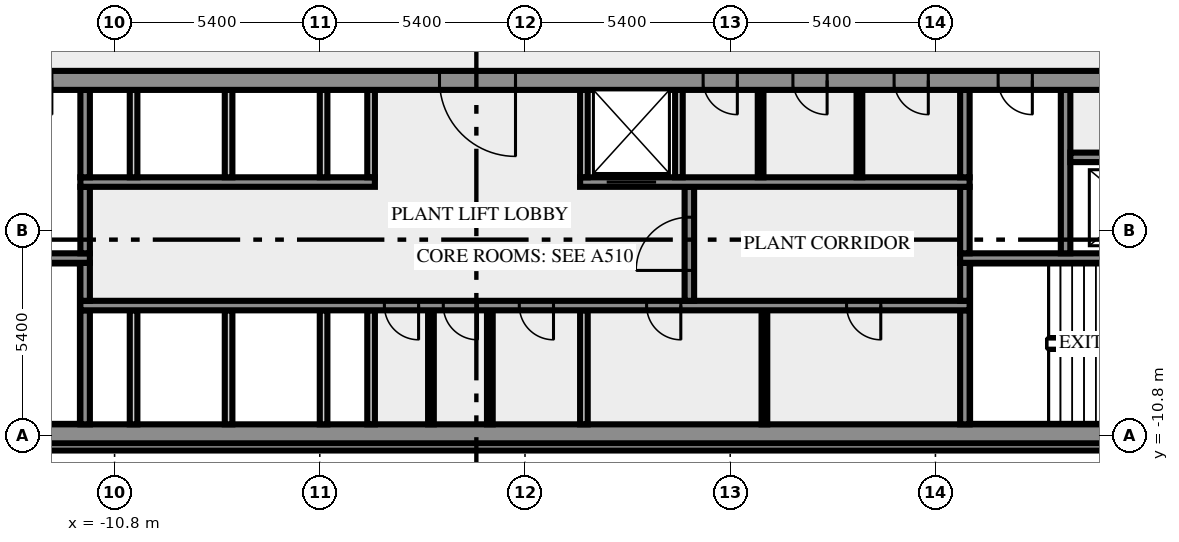
"""IFC4 building model, lengths in metres.
Left out: names, types, materials, properties, quantities, classifications, styles, units other than length and angle.
Written with IfcOpenShell. Run it as: python <this file> out.ifc"""

import sys

from ifc_helpers import new_model, si_unit, direction, frame, frame_2d, origin, place, context, subcontext, project, spatial, rectangle, extrude, element, fill, save


model = new_model("IFC4")
c1 = context("Model", 3, precision=1e-05, world=origin(), true_north=direction((0.0, 1.0)))
c2 = subcontext(c1, "Body", "Model", "MODEL_VIEW")
j1 = project(units=[si_unit("LENGTHUNIT", "METRE"), si_unit("PLANEANGLEUNIT", "RADIAN")], contexts=[c1])
p1 = place(None, origin())
s1 = spatial("IfcSite", under=j1, at=p1, CompositionType="ELEMENT")
p2 = place(p1, origin())
s2 = spatial("IfcBuilding", under=s1, at=p2, CompositionType="ELEMENT")
p3 = place(p2, frame((0.0, 0.0, 273.0)))
s3 = spatial("IfcBuildingStorey", under=s2, at=p3, CompositionType="ELEMENT", Elevation=273.0)
p4 = place(p3, frame((-17.444, -11.088, 0.0), z_axis=(0.0, 0.0, 1.0), x_axis=(1.0, 0.0, 0.0)))
e1 = element("IfcWall", 1, at=p4, inside=s3, PredefinedType="SOLIDWALL", context=c2, shape_type="SweptSolid", body=[
    extrude(rectangle(XDim=34.888, YDim=0.2, at=frame_2d((17.444, 0.0))), origin(), (0.0, 0.0, 1.0), 7.65),
])
p5 = place(p3, frame((-20.0, -10.75, 0.0), z_axis=(0.0, 0.0, 1.0), x_axis=(1.0, 0.0, 0.0)))
e2 = element("IfcWall", 2, at=p5, inside=s3, PredefinedType="SHEAR", context=c2, shape_type="SweptSolid", body=[
    extrude(rectangle(XDim=40.0, YDim=0.5, at=frame_2d((20.0, 0.0))), origin(), (0.0, 0.0, 1.0), 7.65),
])
p6 = place(p5, frame((0.8, 0.0, 1.0)))
e3 = element("IfcOpeningElement", 3, at=p6, cuts=e2, PredefinedType="OPENING", context=c2, shape_type="SweptSolid", body=[
    extrude(rectangle(XDim=1.2, YDim=1.2, at=frame_2d((0.6, 0.6))), frame((0.0, 0.26, 0.0), z_axis=(0.0, -1.0, 0.0), x_axis=(1.0, 0.0, 0.0)), (0.0, 0.0, 1.0), 0.52),
])
p7 = place(p5, frame((38.0, 0.0, 1.0)))
e4 = element("IfcOpeningElement", 4, at=p7, cuts=e2, PredefinedType="OPENING", context=c2, shape_type="SweptSolid", body=[
    extrude(rectangle(XDim=1.2, YDim=1.2, at=frame_2d((0.6, 0.6))), frame((0.0, 0.26, 0.0), z_axis=(0.0, -1.0, 0.0), x_axis=(1.0, 0.0, 0.0)), (0.0, 0.0, 1.0), 0.52),
])
p8 = place(p3, frame((-11.575, -10.5, 0.0), z_axis=(0.0, 0.0, 1.0), x_axis=(0.0, 1.0, 0.0)))
e5 = element("IfcWall", 5, at=p8, inside=s3, PredefinedType="SHEAR", context=c2, shape_type="SweptSolid", body=[
    extrude(rectangle(XDim=3.0, YDim=0.25, at=frame_2d((1.5, 0.0))), origin(), (0.0, 0.0, 1.0), 7.65),
])
for number, where, z_axis, x_axis in (
    (6, (-10.3, -10.5, 0.0), (0.0, 0.0, 1.0), (0.0, 1.0, 0.0)),
    (7, (-7.8, -10.5, 0.0), (0.0, 0.0, 1.0), (0.0, 1.0, 0.0)),
    (8, (-5.3, -10.5, 0.0), (0.0, 0.0, 1.0), (0.0, 1.0, 0.0)),
    (9, (-4.05, -10.5, 0.0), (0.0, 0.0, 1.0), (0.0, 1.0, 0.0)),
):
    element("IfcWall", number, at=place(p3, frame(where, z_axis=z_axis, x_axis=x_axis)), inside=s3, PredefinedType="SOLIDWALL", context=c2, shape_type="SweptSolid", body=[
        extrude(rectangle(XDim=3.0, YDim=0.2, at=frame_2d((1.5, 0.0))), origin(), (0.0, 0.0, 1.0), 7.65),
    ])
for number, where, z_axis, x_axis in (
    (10, (-2.475, -10.5, 0.0), (0.0, 0.0, 1.0), (0.0, 1.0, 0.0)),
    (11, (-0.925, -10.5, 0.0), (0.0, 0.0, 1.0), (0.0, 1.0, 0.0)),
):
    element("IfcWall", number, at=place(p3, frame(where, z_axis=z_axis, x_axis=x_axis)), inside=s3, PredefinedType="PARTITIONING", context=c2, shape_type="SweptSolid", body=[
        extrude(rectangle(XDim=3.0, YDim=0.15, at=frame_2d((1.5, 0.0))), origin(), (0.0, 0.0, 1.0), 7.65),
    ])
p9 = place(p3, frame((1.55, -10.5, 0.0), z_axis=(0.0, 0.0, 1.0), x_axis=(0.0, 1.0, 0.0)))
e12 = element("IfcWall", 12, at=p9, inside=s3, PredefinedType="SOLIDWALL", context=c2, shape_type="SweptSolid", body=[
    extrude(rectangle(XDim=3.0, YDim=0.2, at=frame_2d((1.5, 0.0))), origin(), (0.0, 0.0, 1.0), 7.65),
])
p10 = place(p3, frame((6.3, -10.5, 0.0), z_axis=(0.0, 0.0, 1.0), x_axis=(0.0, 1.0, 0.0)))
e13 = element("IfcWall", 13, at=p10, inside=s3, PredefinedType="PARTITIONING", context=c2, shape_type="SweptSolid", body=[
    extrude(rectangle(XDim=3.0, YDim=0.15, at=frame_2d((1.5, 0.0))), origin(), (0.0, 0.0, 1.0), 7.65),
])
p11 = place(p3, frame((11.575, -10.5, 0.0), z_axis=(0.0, 0.0, 1.0), x_axis=(0.0, 1.0, 0.0)))
e14 = element("IfcWall", 14, at=p11, inside=s3, PredefinedType="SHEAR", context=c2, shape_type="SweptSolid", body=[
    extrude(rectangle(XDim=3.0, YDim=0.25, at=frame_2d((1.5, 0.0))), origin(), (0.0, 0.0, 1.0), 7.65),
])
p12 = place(p3, frame((11.7, -7.375, 0.0), z_axis=(0.0, 0.0, 1.0), x_axis=(-1.0, 0.0, 0.0)))
e15 = element("IfcWall", 15, at=p12, inside=s3, PredefinedType="SHEAR", context=c2, shape_type="SweptSolid", body=[
    extrude(rectangle(XDim=23.4, YDim=0.25, at=frame_2d((11.7, 0.0))), origin(), (0.0, 0.0, 1.0), 7.65),
])
p13 = place(p12, frame((14.5, 0.0, 0.0)))
e16 = element("IfcOpeningElement", 16, at=p13, cuts=e15, PredefinedType="OPENING", context=c2, shape_type="SweptSolid", body=[
    extrude(rectangle(XDim=0.9, YDim=2.1, at=frame_2d((0.45, 1.05))), frame((0.0, 0.135, 0.0), z_axis=(0.0, -1.0, 0.0), x_axis=(1.0, 0.0, 0.0)), (0.0, 0.0, 1.0), 0.27),
])
p14 = place(p12, frame((12.95, 0.0, 0.0)))
e17 = element("IfcOpeningElement", 17, at=p14, cuts=e15, PredefinedType="OPENING", context=c2, shape_type="SweptSolid", body=[
    extrude(rectangle(XDim=0.9, YDim=2.1, at=frame_2d((0.45, 1.05))), frame((0.0, 0.135, 0.0), z_axis=(0.0, -1.0, 0.0), x_axis=(1.0, 0.0, 0.0)), (0.0, 0.0, 1.0), 0.27),
])
p15 = place(p12, frame((10.95, 0.0, 0.0)))
e18 = element("IfcOpeningElement", 18, at=p15, cuts=e15, PredefinedType="OPENING", context=c2, shape_type="SweptSolid", body=[
    extrude(rectangle(XDim=0.9, YDim=2.1, at=frame_2d((0.45, 1.05))), frame((0.0, 0.135, 0.0), z_axis=(0.0, -1.0, 0.0), x_axis=(1.0, 0.0, 0.0)), (0.0, 0.0, 1.0), 0.27),
])
p16 = place(p12, frame((7.6, 0.0, 0.0)))
e19 = element("IfcOpeningElement", 19, at=p16, cuts=e15, PredefinedType="OPENING", context=c2, shape_type="SweptSolid", body=[
    extrude(rectangle(XDim=0.9, YDim=2.1, at=frame_2d((0.45, 1.05))), frame((0.0, 0.135, 0.0), z_axis=(0.0, -1.0, 0.0), x_axis=(1.0, 0.0, 0.0)), (0.0, 0.0, 1.0), 0.27),
])
p17 = place(p12, frame((2.338, 0.0, 0.0)))
e20 = element("IfcOpeningElement", 20, at=p17, cuts=e15, PredefinedType="OPENING", context=c2, shape_type="SweptSolid", body=[
    extrude(rectangle(XDim=0.9, YDim=2.1, at=frame_2d((0.45, 1.05))), frame((0.0, 0.135, 0.0), z_axis=(0.0, -1.0, 0.0), x_axis=(1.0, 0.0, 0.0)), (0.0, 0.0, 1.0), 0.27),
])
p18 = place(p3, frame((-11.575, -7.25, 0.0), z_axis=(0.0, 0.0, 1.0), x_axis=(0.0, 1.0, 0.0)))
e21 = element("IfcWall", 21, at=p18, inside=s3, PredefinedType="SHEAR", context=c2, shape_type="SweptSolid", body=[
    extrude(rectangle(XDim=1.0, YDim=0.25, at=frame_2d((0.5, 0.0))), origin(), (0.0, 0.0, 1.0), 7.65),
])
p19 = place(p3, frame((4.325, -7.25, 0.0), z_axis=(0.0, 0.0, 1.0), x_axis=(0.0, 1.0, 0.0)))
e22 = element("IfcWall", 22, at=p19, inside=s3, PredefinedType="SHEAR", context=c2, shape_type="SweptSolid", body=[
    extrude(rectangle(XDim=3.0, YDim=0.25, at=frame_2d((1.5, 0.0))), origin(), (0.0, 0.0, 1.0), 7.65),
])
p20 = place(p19, frame((0.8, 0.0, 0.0)))
e23 = element("IfcOpeningElement", 23, at=p20, cuts=e22, PredefinedType="OPENING", context=c2, shape_type="SweptSolid", body=[
    extrude(rectangle(XDim=1.4, YDim=2.1, at=frame_2d((0.7, 1.05))), frame((0.0, 0.135, 0.0), z_axis=(0.0, -1.0, 0.0), x_axis=(1.0, 0.0, 0.0)), (0.0, 0.0, 1.0), 0.27),
])
p21 = place(p3, frame((11.575, -7.25, 0.0), z_axis=(0.0, 0.0, 1.0), x_axis=(0.0, 1.0, 0.0)))
e24 = element("IfcWall", 24, at=p21, inside=s3, PredefinedType="SHEAR", context=c2, shape_type="SweptSolid", body=[
    extrude(rectangle(XDim=1.0, YDim=0.25, at=frame_2d((0.5, 0.0))), origin(), (0.0, 0.0, 1.0), 7.65),
])
p22 = place(p3, frame((-11.45, -6.125, 0.0), z_axis=(0.0, 0.0, 1.0), x_axis=(-1.0, 0.0, 0.0)))
e25 = element("IfcWall", 25, at=p22, inside=s3, PredefinedType="SHEAR", context=c2, shape_type="SweptSolid", body=[
    extrude(rectangle(XDim=8.05, YDim=0.25, at=frame_2d((4.025, 0.0))), origin(), (0.0, 0.0, 1.0), 7.65),
])
p23 = place(p22, frame((6.2, 0.0, 0.0)))
e26 = element("IfcOpeningElement", 26, at=p23, cuts=e25, PredefinedType="OPENING", context=c2, shape_type="SweptSolid", body=[
    extrude(rectangle(XDim=1.8, YDim=2.1, at=frame_2d((0.9, 1.05))), frame((0.0, 0.135, 0.0), z_axis=(0.0, -1.0, 0.0), x_axis=(1.0, 0.0, 0.0)), (0.0, 0.0, 1.0), 0.27),
])
p24 = place(p3, frame((19.5, -6.125, 0.0), z_axis=(0.0, 0.0, 1.0), x_axis=(-1.0, 0.0, 0.0)))
e27 = element("IfcWall", 27, at=p24, inside=s3, PredefinedType="SHEAR", context=c2, shape_type="SweptSolid", body=[
    extrude(rectangle(XDim=8.05, YDim=0.25, at=frame_2d((4.025, 0.0))), origin(), (0.0, 0.0, 1.0), 7.65),
])
p25 = place(p24, frame((0.05, 0.0, 0.0)))
e28 = element("IfcOpeningElement", 28, at=p25, cuts=e27, PredefinedType="OPENING", context=c2, shape_type="SweptSolid", body=[
    extrude(rectangle(XDim=1.8, YDim=2.1, at=frame_2d((0.9, 1.05))), frame((0.0, 0.135, 0.0), z_axis=(0.0, -1.0, 0.0), x_axis=(1.0, 0.0, 0.0)), (0.0, 0.0, 1.0), 0.27),
])
for number, where, z_axis, x_axis in (
    (29, (-11.575, -6.0, 0.0), (0.0, 0.0, 1.0), (0.0, 1.0, 0.0)),
    (30, (11.575, -6.0, 0.0), (0.0, 0.0, 1.0), (0.0, 1.0, 0.0)),
):
    element("IfcWall", number, at=place(p3, frame(where, z_axis=z_axis, x_axis=x_axis)), inside=s3, PredefinedType="SHEAR", context=c2, shape_type="SweptSolid", body=[
        extrude(rectangle(XDim=1.75, YDim=0.25, at=frame_2d((0.875, 0.0))), origin(), (0.0, 0.0, 1.0), 7.65),
    ])
p26 = place(p3, frame((14.225, -6.0, 0.0), z_axis=(0.0, 0.0, 1.0), x_axis=(0.0, 1.0, 0.0)))
e31 = element("IfcWall", 31, at=p26, inside=s3, PredefinedType="SHEAR", context=c2, shape_type="SweptSolid", body=[
    extrude(rectangle(XDim=4.3, YDim=0.25, at=frame_2d((2.15, 0.0))), origin(), (0.0, 0.0, 1.0), 7.65),
])
p27 = place(p3, frame((-11.7, -4.125, 0.0), z_axis=(0.0, 0.0, 1.0), x_axis=(1.0, 0.0, 0.0)))
e32 = element("IfcWall", 32, at=p27, inside=s3, PredefinedType="SHEAR", context=c2, shape_type="SweptSolid", body=[
    extrude(rectangle(XDim=7.75, YDim=0.25, at=frame_2d((3.875, 0.0))), origin(), (0.0, 0.0, 1.0), 7.65),
])
p28 = place(p3, frame((1.45, -4.125, 0.0), z_axis=(0.0, 0.0, 1.0), x_axis=(1.0, 0.0, 0.0)))
e33 = element("IfcWall", 33, at=p28, inside=s3, PredefinedType="SHEAR", context=c2, shape_type="SweptSolid", body=[
    extrude(rectangle(XDim=10.25, YDim=0.25, at=frame_2d((5.125, 0.0))), origin(), (0.0, 0.0, 1.0), 7.65),
])
p29 = place(p28, frame((0.7, 0.0, 0.0)))
e34 = element("IfcOpeningElement", 34, at=p29, cuts=e33, PredefinedType="OPENING", context=c2, shape_type="SweptSolid", body=[
    extrude(rectangle(XDim=1.3, YDim=2.1, at=frame_2d((0.65, 1.05))), frame((0.0, 0.135, 0.0), z_axis=(0.0, -1.0, 0.0), x_axis=(1.0, 0.0, 0.0)), (0.0, 0.0, 1.0), 0.27),
])
p30 = place(p3, frame((-11.575, -4.0, 0.0), z_axis=(0.0, 0.0, 1.0), x_axis=(0.0, 1.0, 0.0)))
e35 = element("IfcWall", 35, at=p30, inside=s3, PredefinedType="SHEAR", context=c2, shape_type="SweptSolid", body=[
    extrude(rectangle(XDim=2.3, YDim=0.25, at=frame_2d((1.15, 0.0))), origin(), (0.0, 0.0, 1.0), 7.65),
])
for number, where, z_axis, x_axis in (
    (36, (-10.3, -4.0, 0.0), (0.0, 0.0, 1.0), (0.0, 1.0, 0.0)),
    (37, (-7.8, -4.0, 0.0), (0.0, 0.0, 1.0), (0.0, 1.0, 0.0)),
    (38, (-5.3, -4.0, 0.0), (0.0, 0.0, 1.0), (0.0, 1.0, 0.0)),
    (39, (-4.05, -4.0, 0.0), (0.0, 0.0, 1.0), (0.0, 1.0, 0.0)),
    (40, (1.55, -4.0, 0.0), (0.0, 0.0, 1.0), (0.0, 1.0, 0.0)),
    (41, (4.05, -4.0, 0.0), (0.0, 0.0, 1.0), (0.0, 1.0, 0.0)),
):
    element("IfcWall", number, at=place(p3, frame(where, z_axis=z_axis, x_axis=x_axis)), inside=s3, PredefinedType="SOLIDWALL", context=c2, shape_type="SweptSolid", body=[
        extrude(rectangle(XDim=2.3, YDim=0.2, at=frame_2d((1.15, 0.0))), origin(), (0.0, 0.0, 1.0), 7.65),
    ])
for number, where, z_axis, x_axis in (
    (42, (6.2, -4.0, 0.0), (0.0, 0.0, 1.0), (0.0, 1.0, 0.0)),
    (43, (8.8, -4.0, 0.0), (0.0, 0.0, 1.0), (0.0, 1.0, 0.0)),
):
    element("IfcWall", number, at=place(p3, frame(where, z_axis=z_axis, x_axis=x_axis)), inside=s3, PredefinedType="PARTITIONING", context=c2, shape_type="SweptSolid", body=[
        extrude(rectangle(XDim=2.3, YDim=0.15, at=frame_2d((1.15, 0.0))), origin(), (0.0, 0.0, 1.0), 7.65),
    ])
p31 = place(p3, frame((11.575, -4.0, 0.0), z_axis=(0.0, 0.0, 1.0), x_axis=(0.0, 1.0, 0.0)))
e44 = element("IfcWall", 44, at=p31, inside=s3, PredefinedType="SHEAR", context=c2, shape_type="SweptSolid", body=[
    extrude(rectangle(XDim=2.3, YDim=0.25, at=frame_2d((1.15, 0.0))), origin(), (0.0, 0.0, 1.0), 7.65),
])
p32 = place(p3, frame((14.35, -3.475, 0.0), z_axis=(0.0, 0.0, 1.0), x_axis=(1.0, 0.0, 0.0)))
e45 = element("IfcWall", 45, at=p32, inside=s3, PredefinedType="SHEAR", context=c2, shape_type="SweptSolid", body=[
    extrude(rectangle(XDim=3.0, YDim=0.25, at=frame_2d((1.5, 0.0))), origin(), (0.0, 0.0, 1.0), 7.65),
])
p33 = place(p3, frame((20.49, -1.45, 0.0), z_axis=(0.0, 0.0, 1.0), x_axis=(-1.0, 0.0, 0.0)))
e46 = element("IfcWall", 46, at=p33, inside=s3, PredefinedType="SHEAR", context=c2, shape_type="SweptSolid", body=[
    extrude(rectangle(XDim=40.98, YDim=0.5, at=frame_2d((20.49, 0.0))), origin(), (0.0, 0.0, 1.0), 7.65),
])
p34 = place(p33, frame((38.14, 0.0, 0.0)))
e47 = element("IfcOpeningElement", 47, at=p34, cuts=e46, PredefinedType="OPENING", context=c2, shape_type="SweptSolid", body=[
    extrude(rectangle(XDim=1.8, YDim=2.1, at=frame_2d((0.9, 1.05))), frame((0.0, 0.26, 0.0), z_axis=(0.0, -1.0, 0.0), x_axis=(1.0, 0.0, 0.0)), (0.0, 0.0, 1.0), 0.52),
])
p35 = place(p33, frame((36.728, 0.0, 0.0)))
e48 = element("IfcOpeningElement", 48, at=p35, cuts=e46, PredefinedType="OPENING", context=c2, shape_type="SweptSolid", body=[
    extrude(rectangle(XDim=0.8, YDim=2.1, at=frame_2d((0.4, 1.05))), frame((0.0, 0.26, 0.0), z_axis=(0.0, -1.0, 0.0), x_axis=(1.0, 0.0, 0.0)), (0.0, 0.0, 1.0), 0.52),
])
p36 = place(p33, frame((35.153, 0.0, 0.0)))
e49 = element("IfcOpeningElement", 49, at=p36, cuts=e46, PredefinedType="OPENING", context=c2, shape_type="SweptSolid", body=[
    extrude(rectangle(XDim=0.8, YDim=2.1, at=frame_2d((0.4, 1.05))), frame((0.0, 0.26, 0.0), z_axis=(0.0, -1.0, 0.0), x_axis=(1.0, 0.0, 0.0)), (0.0, 0.0, 1.0), 0.52),
])
p37 = place(p33, frame((32.94, 0.0, 0.0)))
e50 = element("IfcOpeningElement", 50, at=p37, cuts=e46, PredefinedType="OPENING", context=c2, shape_type="SweptSolid", body=[
    extrude(rectangle(XDim=0.9, YDim=2.1, at=frame_2d((0.45, 1.05))), frame((0.0, 0.26, 0.0), z_axis=(0.0, -1.0, 0.0), x_axis=(1.0, 0.0, 0.0)), (0.0, 0.0, 1.0), 0.52),
])
p38 = place(p33, frame((20.74, 0.0, 0.0)))
e51 = element("IfcOpeningElement", 51, at=p38, cuts=e46, PredefinedType="OPENING", context=c2, shape_type="SweptSolid", body=[
    extrude(rectangle(XDim=2.0, YDim=2.1, at=frame_2d((1.0, 1.05))), frame((0.0, 0.26, 0.0), z_axis=(0.0, -1.0, 0.0), x_axis=(1.0, 0.0, 0.0)), (0.0, 0.0, 1.0), 0.52),
])
p39 = place(p33, frame((14.903, 0.0, 0.0)))
e52 = element("IfcOpeningElement", 52, at=p39, cuts=e46, PredefinedType="OPENING", context=c2, shape_type="SweptSolid", body=[
    extrude(rectangle(XDim=0.9, YDim=2.1, at=frame_2d((0.45, 1.05))), frame((0.0, 0.26, 0.0), z_axis=(0.0, -1.0, 0.0), x_axis=(1.0, 0.0, 0.0)), (0.0, 0.0, 1.0), 0.52),
])
p40 = place(p33, frame((12.54, 0.0, 0.0)))
e53 = element("IfcOpeningElement", 53, at=p40, cuts=e46, PredefinedType="OPENING", context=c2, shape_type="SweptSolid", body=[
    extrude(rectangle(XDim=0.9, YDim=2.1, at=frame_2d((0.45, 1.05))), frame((0.0, 0.26, 0.0), z_axis=(0.0, -1.0, 0.0), x_axis=(1.0, 0.0, 0.0)), (0.0, 0.0, 1.0), 0.52),
])
p41 = place(p33, frame((9.877, 0.0, 0.0)))
e54 = element("IfcOpeningElement", 54, at=p41, cuts=e46, PredefinedType="OPENING", context=c2, shape_type="SweptSolid", body=[
    extrude(rectangle(XDim=0.9, YDim=2.1, at=frame_2d((0.45, 1.05))), frame((0.0, 0.26, 0.0), z_axis=(0.0, -1.0, 0.0), x_axis=(1.0, 0.0, 0.0)), (0.0, 0.0, 1.0), 0.52),
])
p42 = place(p33, frame((7.14, 0.0, 0.0)))
e55 = element("IfcOpeningElement", 55, at=p42, cuts=e46, PredefinedType="OPENING", context=c2, shape_type="SweptSolid", body=[
    extrude(rectangle(XDim=0.9, YDim=2.1, at=frame_2d((0.45, 1.05))), frame((0.0, 0.26, 0.0), z_axis=(0.0, -1.0, 0.0), x_axis=(1.0, 0.0, 0.0)), (0.0, 0.0, 1.0), 0.52),
])
p43 = place(p33, frame((4.19, 0.0, 0.0)))
e56 = element("IfcOpeningElement", 56, at=p43, cuts=e46, PredefinedType="OPENING", context=c2, shape_type="SweptSolid", body=[
    extrude(rectangle(XDim=0.9, YDim=2.1, at=frame_2d((0.45, 1.05))), frame((0.0, 0.26, 0.0), z_axis=(0.0, -1.0, 0.0), x_axis=(1.0, 0.0, 0.0)), (0.0, 0.0, 1.0), 0.52),
])
p44 = place(p33, frame((1.04, 0.0, 0.0)))
e57 = element("IfcOpeningElement", 57, at=p44, cuts=e46, PredefinedType="OPENING", context=c2, shape_type="SweptSolid", body=[
    extrude(rectangle(XDim=1.8, YDim=2.1, at=frame_2d((0.9, 1.05))), frame((0.0, 0.26, 0.0), z_axis=(0.0, -1.0, 0.0), x_axis=(1.0, 0.0, 0.0)), (0.0, 0.0, 1.0), 0.52),
])
p45 = place(p13, origin())
e58 = element("IfcDoor", 58, at=p45, inside=s3, OperationType="SINGLE_SWING_RIGHT", PredefinedType="DOOR", context=c2, shape_type="SweptSolid", body=[
    extrude(rectangle(XDim=0.9, YDim=2.1, at=frame_2d((0.45, 1.05))), frame((0.0, 0.025, 0.0), z_axis=(0.0, -1.0, 0.0), x_axis=(1.0, 0.0, 0.0)), (0.0, 0.0, 1.0), 0.05),
])
fill(e16, e58)
p46 = place(p14, origin())
e59 = element("IfcDoor", 59, at=p46, inside=s3, OperationType="SINGLE_SWING_RIGHT", PredefinedType="DOOR", context=c2, shape_type="SweptSolid", body=[
    extrude(rectangle(XDim=0.9, YDim=2.1, at=frame_2d((0.45, 1.05))), frame((0.0, 0.025, 0.0), z_axis=(0.0, -1.0, 0.0), x_axis=(1.0, 0.0, 0.0)), (0.0, 0.0, 1.0), 0.05),
])
fill(e17, e59)
p47 = place(p15, origin())
e60 = element("IfcDoor", 60, at=p47, inside=s3, OperationType="SINGLE_SWING_LEFT", PredefinedType="DOOR", context=c2, shape_type="SweptSolid", body=[
    extrude(rectangle(XDim=0.9, YDim=2.1, at=frame_2d((0.45, 1.05))), frame((0.0, 0.025, 0.0), z_axis=(0.0, -1.0, 0.0), x_axis=(1.0, 0.0, 0.0)), (0.0, 0.0, 1.0), 0.05),
])
fill(e18, e60)
p48 = place(p16, origin())
e61 = element("IfcDoor", 61, at=p48, inside=s3, OperationType="SINGLE_SWING_LEFT", PredefinedType="DOOR", context=c2, shape_type="SweptSolid", body=[
    extrude(rectangle(XDim=0.9, YDim=2.1, at=frame_2d((0.45, 1.05))), frame((0.0, 0.025, 0.0), z_axis=(0.0, -1.0, 0.0), x_axis=(1.0, 0.0, 0.0)), (0.0, 0.0, 1.0), 0.05),
])
fill(e19, e61)
p49 = place(p17, origin())
e62 = element("IfcDoor", 62, at=p49, inside=s3, OperationType="SINGLE_SWING_LEFT", PredefinedType="DOOR", context=c2, shape_type="SweptSolid", body=[
    extrude(rectangle(XDim=0.9, YDim=2.1, at=frame_2d((0.45, 1.05))), frame((0.0, 0.025, 0.0), z_axis=(0.0, -1.0, 0.0), x_axis=(1.0, 0.0, 0.0)), (0.0, 0.0, 1.0), 0.05),
])
fill(e20, e62)
p50 = place(p20, origin())
e63 = element("IfcDoor", 63, at=p50, inside=s3, OperationType="DOUBLE_DOOR_SINGLE_SWING", PredefinedType="DOOR", context=c2, shape_type="SweptSolid", body=[
    extrude(rectangle(XDim=1.4, YDim=2.1, at=frame_2d((0.7, 1.05))), frame((0.0, 0.025, 0.0), z_axis=(0.0, -1.0, 0.0), x_axis=(1.0, 0.0, 0.0)), (0.0, 0.0, 1.0), 0.05),
])
fill(e23, e63)
p51 = place(p29, origin())
e64 = element("IfcDoor", 64, at=p51, inside=s3, OperationType="DOUBLE_DOOR_SLIDING", PredefinedType="DOOR", context=c2, shape_type="SweptSolid", body=[
    extrude(rectangle(XDim=1.3, YDim=2.1, at=frame_2d((0.65, 1.05))), frame((0.0, 0.025, 0.0), z_axis=(0.0, -1.0, 0.0), x_axis=(1.0, 0.0, 0.0)), (0.0, 0.0, 1.0), 0.05),
])
fill(e34, e64)
p52 = place(p38, origin())
e65 = element("IfcDoor", 65, at=p52, inside=s3, OperationType="DOUBLE_DOOR_SINGLE_SWING", PredefinedType="DOOR", context=c2, shape_type="SweptSolid", body=[
    extrude(rectangle(XDim=2.0, YDim=2.1, at=frame_2d((1.0, 1.05))), frame((0.0, 0.025, 0.0), z_axis=(0.0, -1.0, 0.0), x_axis=(1.0, 0.0, 0.0)), (0.0, 0.0, 1.0), 0.05),
])
fill(e51, e65)
p53 = place(p39, origin())
e66 = element("IfcDoor", 66, at=p53, inside=s3, OperationType="SINGLE_SWING_LEFT", PredefinedType="DOOR", context=c2, shape_type="SweptSolid", body=[
    extrude(rectangle(XDim=0.9, YDim=2.1, at=frame_2d((0.45, 1.05))), frame((0.0, 0.025, 0.0), z_axis=(0.0, -1.0, 0.0), x_axis=(1.0, 0.0, 0.0)), (0.0, 0.0, 1.0), 0.05),
])
fill(e52, e66)
p54 = place(p40, origin())
e67 = element("IfcDoor", 67, at=p54, inside=s3, OperationType="SINGLE_SWING_LEFT", PredefinedType="DOOR", context=c2, shape_type="SweptSolid", body=[
    extrude(rectangle(XDim=0.9, YDim=2.1, at=frame_2d((0.45, 1.05))), frame((0.0, 0.025, 0.0), z_axis=(0.0, -1.0, 0.0), x_axis=(1.0, 0.0, 0.0)), (0.0, 0.0, 1.0), 0.05),
])
fill(e53, e67)
p55 = place(p41, origin())
e68 = element("IfcDoor", 68, at=p55, inside=s3, OperationType="SINGLE_SWING_LEFT", PredefinedType="DOOR", context=c2, shape_type="SweptSolid", body=[
    extrude(rectangle(XDim=0.9, YDim=2.1, at=frame_2d((0.45, 1.05))), frame((0.0, 0.025, 0.0), z_axis=(0.0, -1.0, 0.0), x_axis=(1.0, 0.0, 0.0)), (0.0, 0.0, 1.0), 0.05),
])
fill(e54, e68)
p56 = place(p42, origin())
e69 = element("IfcDoor", 69, at=p56, inside=s3, OperationType="SINGLE_SWING_LEFT", PredefinedType="DOOR", context=c2, shape_type="SweptSolid", body=[
    extrude(rectangle(XDim=0.9, YDim=2.1, at=frame_2d((0.45, 1.05))), frame((0.0, 0.025, 0.0), z_axis=(0.0, -1.0, 0.0), x_axis=(1.0, 0.0, 0.0)), (0.0, 0.0, 1.0), 0.05),
])
fill(e55, e69)
save(model, sys.argv[1])
